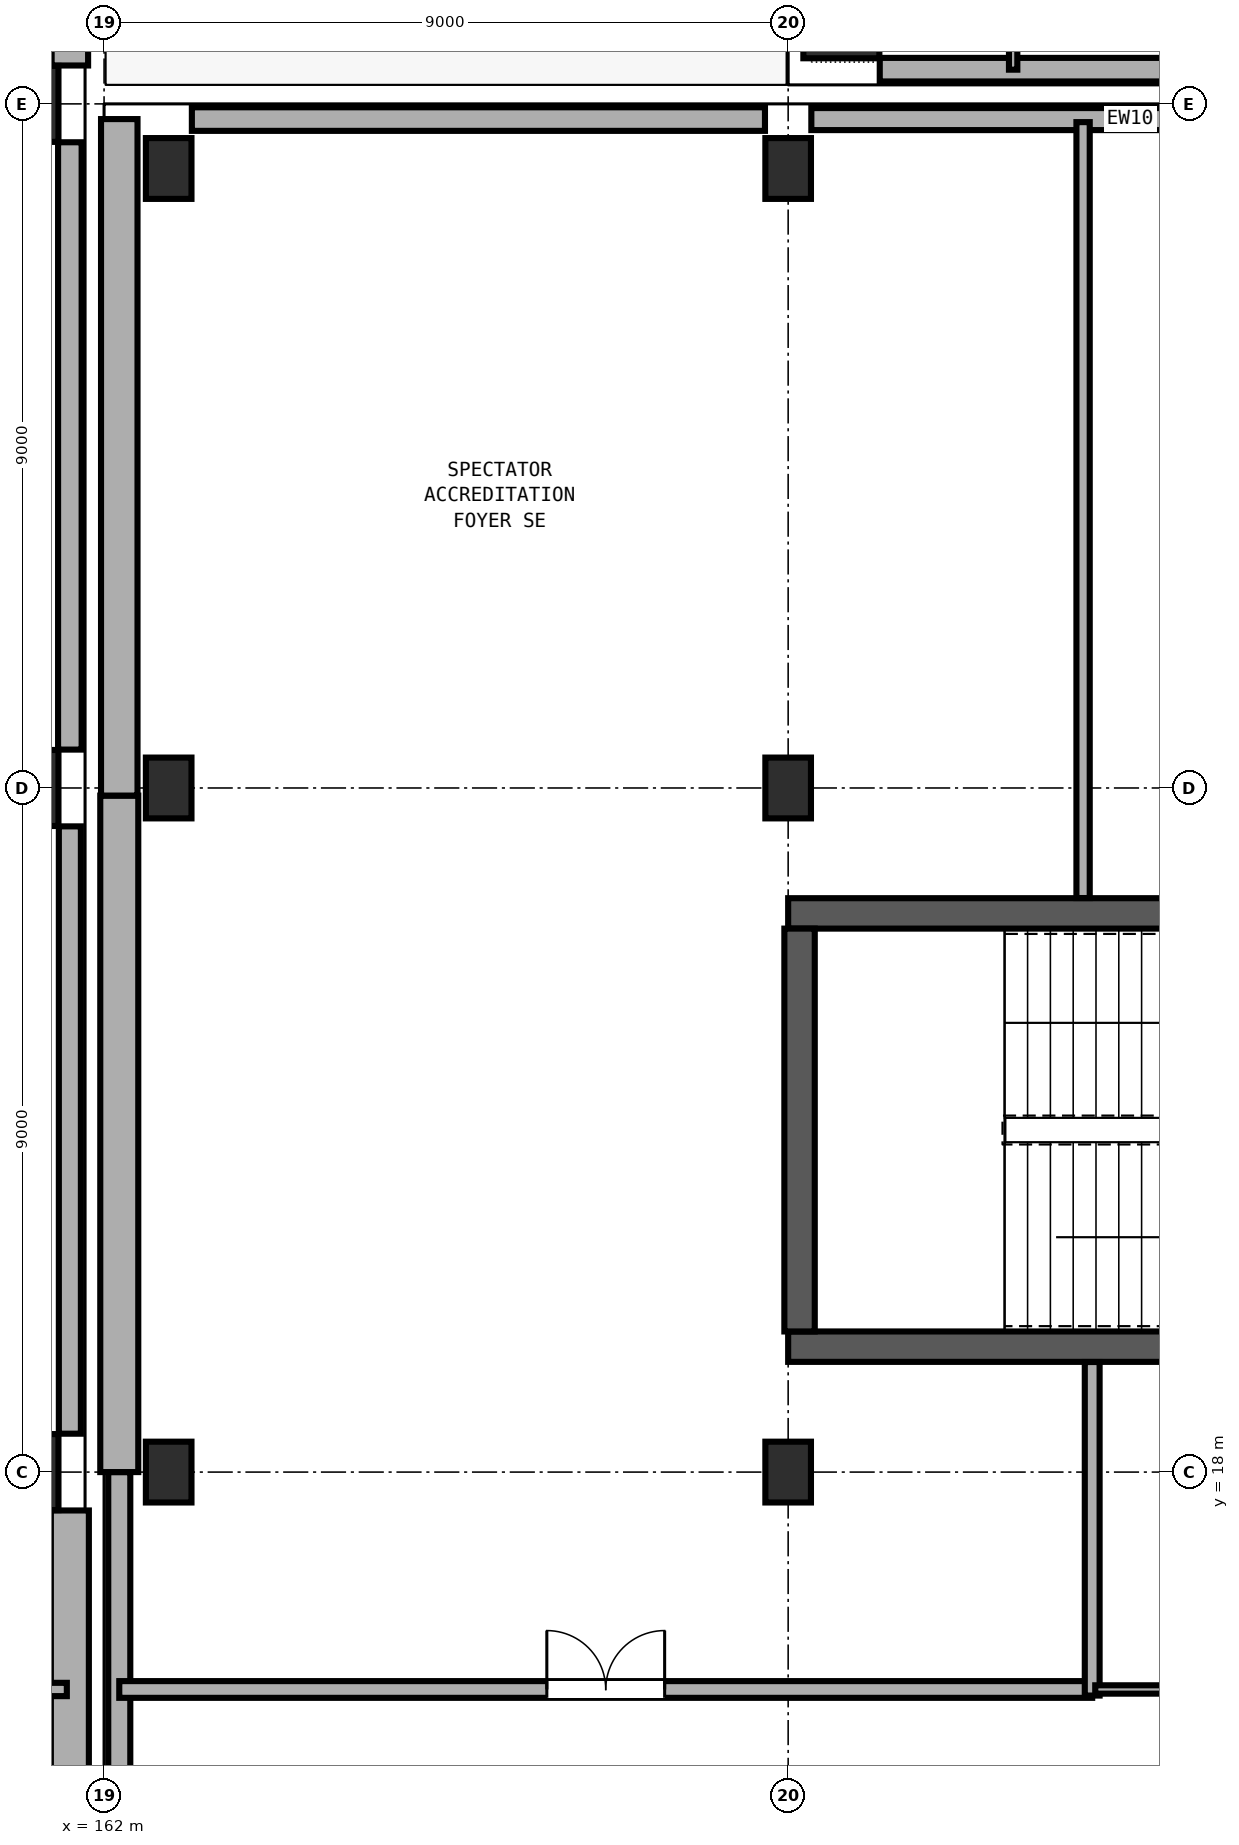
"""IFC4 building model, lengths in metres.
Left out: names, types, materials, properties, quantities, classifications, styles, units other than length and angle.
Written with IfcOpenShell. Run it as: python <this file> out.ifc"""

import sys

from ifc_helpers import new_model, si_unit, direction, frame, frame_2d, origin, origin_2d, place, context, subcontext, project, spatial, rectangle, extrude, element, fill, save


model = new_model("IFC4")
c1 = context("Model", 3, precision=1e-05, world=origin(), true_north=direction((0.0, 1.0)))
c2 = subcontext(c1, "Body", "Model", "MODEL_VIEW")
j1 = project(units=[si_unit("LENGTHUNIT", "METRE"), si_unit("PLANEANGLEUNIT", "RADIAN")], contexts=[c1])
p1 = place(None, origin())
s1 = spatial("IfcSite", under=j1, at=p1, CompositionType="ELEMENT")
p2 = place(p1, origin())
s2 = spatial("IfcBuilding", under=s1, at=p2, CompositionType="ELEMENT")
p3 = place(p2, origin())
s3 = spatial("IfcBuildingStorey", under=s2, at=p3, CompositionType="ELEMENT", Elevation=0.0)
for number, where, z_axis, x_axis in (
    (1, (171.7, 37.1, 0.0), (0.0, 0.0, 1.0), (1.0, 0.0, 0.0)),
    (2, (160.9, 18.0, 0.0), (0.0, 0.0, 1.0), (1.0, 0.0, 0.0)),
    (3, (160.9, 27.0, 0.0), (0.0, 0.0, 1.0), (1.0, 0.0, 0.0)),
    (4, (160.9, 36.0, 0.0), (0.0, 0.0, 1.0), (1.0, 0.0, 0.0)),
):
    element("IfcColumn", number, at=place(p3, frame(where, z_axis=z_axis, x_axis=x_axis)), inside=s3, PredefinedType="COLUMN", context=c2, shape_type="SweptSolid", body=[
        extrude(rectangle(XDim=1.0, YDim=1.0, at=origin_2d()), origin(), (0.0, 0.0, 1.0), 4.8),
    ])
for number, where, z_axis, x_axis in (
    (5, (162.85, 18.0, 0.0), (0.0, 0.0, 1.0), (1.0, 0.0, 0.0)),
    (6, (162.85, 27.0, 0.0), (0.0, 0.0, 1.0), (1.0, 0.0, 0.0)),
    (7, (162.85, 35.15, 0.0), (0.0, 0.0, 1.0), (1.0, 0.0, 0.0)),
    (8, (171.0, 18.0, 0.0), (0.0, 0.0, 1.0), (1.0, 0.0, 0.0)),
    (9, (171.0, 27.0, 0.0), (0.0, 0.0, 1.0), (1.0, 0.0, 0.0)),
    (10, (171.0, 35.15, 0.0), (0.0, 0.0, 1.0), (1.0, 0.0, 0.0)),
):
    element("IfcColumn", number, at=place(p3, frame(where, z_axis=z_axis, x_axis=x_axis)), inside=s3, PredefinedType="COLUMN", context=c2, shape_type="SweptSolid", body=[
        extrude(rectangle(XDim=0.6, YDim=0.8, at=origin_2d()), origin(), (0.0, 0.0, 1.0), 4.8),
    ])
p4 = place(p3, frame((171.0, 19.65, 0.0), z_axis=(0.0, 0.0, 1.0), x_axis=(1.0, 0.0, 0.0)))
e11 = element("IfcWall", 11, at=p4, inside=s3, PredefinedType="SHEAR", context=c2, shape_type="SweptSolid", body=[
    extrude(rectangle(XDim=18.0, YDim=0.4, at=frame_2d((9.0, 0.0))), origin(), (0.0, 0.0, 1.0), 4.5),
])
p5 = place(p4, frame((11.4, 0.0, 0.0)))
e12 = element("IfcOpeningElement", 12, at=p5, cuts=e11, PredefinedType="OPENING", context=c2, shape_type="SweptSolid", body=[
    extrude(rectangle(XDim=1.9, YDim=2.25, at=frame_2d((0.95, 1.125))), frame((0.0, 0.21, 0.0), z_axis=(0.0, -1.0, 0.0), x_axis=(1.0, 0.0, 0.0)), (0.0, 0.0, 1.0), 0.42),
])
p6 = place(p3, frame((189.0, 25.35, 0.0), z_axis=(0.0, 0.0, 1.0), x_axis=(-1.0, 0.0, 0.0)))
e13 = element("IfcWall", 13, at=p6, inside=s3, PredefinedType="SHEAR", context=c2, shape_type="SweptSolid", body=[
    extrude(rectangle(XDim=18.0, YDim=0.4, at=frame_2d((9.0, 0.0))), origin(), (0.0, 0.0, 1.0), 4.5),
])
p7 = place(p3, frame((171.15, 25.15, 0.0), z_axis=(0.0, 0.0, 1.0), x_axis=(0.0, -1.0, 0.0)))
e14 = element("IfcWall", 14, at=p7, inside=s3, PredefinedType="SHEAR", context=c2, shape_type="SweptSolid", body=[
    extrude(rectangle(XDim=5.3, YDim=0.4, at=frame_2d((2.65, 0.0))), origin(), (0.0, 0.0, 1.0), 4.5),
])
p8 = place(p3, frame((179.445, 36.45, 0.0), z_axis=(0.0, 0.0, 1.0), x_axis=(-1.0, 0.0, 0.0)))
e15 = element("IfcWall", 15, at=p8, inside=s3, PredefinedType="SOLIDWALL", context=c2, shape_type="SweptSolid", body=[
    extrude(rectangle(XDim=7.24, YDim=0.31, at=frame_2d((3.62, 0.0))), origin(), (0.0, 0.0, 1.0), 3.28),
])
p9 = place(p3, frame((161.55, 44.8, 0.0), z_axis=(0.0, 0.0, 1.0), x_axis=(0.0, -1.0, 0.0)))
e16 = element("IfcWall", 16, at=p9, inside=s3, PredefinedType="SOLIDWALL", context=c2, shape_type="SweptSolid", body=[
    extrude(rectangle(XDim=8.295, YDim=0.48, at=frame_2d((4.147, 0.0))), origin(), (0.0, 0.0, 1.0), 3.28),
])
p10 = place(p3, frame((161.55, 35.495, 0.0), z_axis=(0.0, 0.0, 1.0), x_axis=(0.0, -1.0, 0.0)))
e17 = element("IfcWall", 17, at=p10, inside=s3, PredefinedType="SOLIDWALL", context=c2, shape_type="SweptSolid", body=[
    extrude(rectangle(XDim=7.99, YDim=0.31, at=frame_2d((3.995, 0.0))), origin(), (0.0, 0.0, 1.0), 3.28),
])
p11 = place(p3, frame((161.55, 26.495, 0.0), z_axis=(0.0, 0.0, 1.0), x_axis=(0.0, -1.0, 0.0)))
e18 = element("IfcWall", 18, at=p11, inside=s3, PredefinedType="SOLIDWALL", context=c2, shape_type="SweptSolid", body=[
    extrude(rectangle(XDim=7.99, YDim=0.29, at=frame_2d((3.995, 0.0))), origin(), (0.0, 0.0, 1.0), 3.28),
])
p12 = place(p3, frame((161.55, 17.495, 0.0), z_axis=(0.0, 0.0, 1.0), x_axis=(0.0, -1.0, 0.0)))
e19 = element("IfcWall", 19, at=p12, inside=s3, PredefinedType="SOLIDWALL", context=c2, shape_type="SweptSolid", body=[
    extrude(rectangle(XDim=7.99, YDim=0.5, at=frame_2d((3.995, 0.0))), origin(), (0.0, 0.0, 1.0), 3.28),
])
p13 = place(p3, frame((162.2, 9.1, 0.0), z_axis=(0.0, 0.0, 1.0), x_axis=(0.0, 1.0, 0.0)))
e20 = element("IfcWall", 20, at=p13, inside=s3, PredefinedType="SOLIDWALL", context=c2, shape_type="SweptSolid", body=[
    extrude(rectangle(XDim=8.9, YDim=0.29, at=frame_2d((4.45, 0.0))), origin(), (0.0, 0.0, 1.0), 3.28),
])
p14 = place(p3, frame((162.2, 18.0, 0.0), z_axis=(0.0, 0.0, 1.0), x_axis=(0.0, 1.0, 0.0)))
e21 = element("IfcWall", 21, at=p14, inside=s3, PredefinedType="SOLIDWALL", context=c2, shape_type="SweptSolid", body=[
    extrude(rectangle(XDim=8.9, YDim=0.5, at=frame_2d((4.45, 0.0))), origin(), (0.0, 0.0, 1.0), 3.28),
])
p15 = place(p3, frame((162.2, 26.9, 0.0), z_axis=(0.0, 0.0, 1.0), x_axis=(0.0, 1.0, 0.0)))
e22 = element("IfcWall", 22, at=p15, inside=s3, PredefinedType="SOLIDWALL", context=c2, shape_type="SweptSolid", body=[
    extrude(rectangle(XDim=8.9, YDim=0.48, at=frame_2d((4.45, 0.0))), origin(), (0.0, 0.0, 1.0), 3.28),
])
p16 = place(p3, frame((163.155, 35.8, 0.0), z_axis=(0.0, 0.0, 1.0), x_axis=(1.0, 0.0, 0.0)))
e23 = element("IfcWall", 23, at=p16, inside=s3, PredefinedType="SOLIDWALL", context=c2, shape_type="SweptSolid", body=[
    extrude(rectangle(XDim=7.54, YDim=0.31, at=frame_2d((3.77, 0.0))), origin(), (0.0, 0.0, 1.0), 3.28),
])
p17 = place(p3, frame((171.305, 35.8, 0.0), z_axis=(0.0, 0.0, 1.0), x_axis=(1.0, 0.0, 0.0)))
e24 = element("IfcWall", 24, at=p17, inside=s3, PredefinedType="SOLIDWALL", context=c2, shape_type="SweptSolid", body=[
    extrude(rectangle(XDim=8.39, YDim=0.29, at=frame_2d((4.195, 0.0))), origin(), (0.0, 0.0, 1.0), 3.28),
])
p18 = place(p3, frame((173.96, 36.45, 0.0), z_axis=(0.0, 0.0, 1.0), x_axis=(0.0, 1.0, 0.0)))
e25 = element("IfcWall", 25, at=p18, inside=s3, PredefinedType="PARTITIONING", context=c2, shape_type="SweptSolid", body=[
    extrude(rectangle(XDim=17.892, YDim=0.11, at=frame_2d((8.946, 0.0))), origin(), (0.0, 0.0, 1.0), 3.28),
])
p19 = place(p18, frame((6.203, 0.0, 0.0)))
e26 = element("IfcOpeningElement", 26, at=p19, cuts=e25, PredefinedType="OPENING", context=c2, shape_type="SweptSolid", body=[
    extrude(rectangle(XDim=1.25, YDim=2.15, at=frame_2d((0.625, 1.075))), frame((0.0, 0.065, 0.0), z_axis=(0.0, -1.0, 0.0), x_axis=(1.0, 0.0, 0.0)), (0.0, 0.0, 1.0), 0.13),
])
p20 = place(p3, frame((161.51, 15.14, 0.0), z_axis=(0.0, 0.0, 1.0), x_axis=(-1.0, 0.0, 0.0)))
e27 = element("IfcWall", 27, at=p20, inside=s3, PredefinedType="PARTITIONING", context=c2, shape_type="SweptSolid", body=[
    extrude(rectangle(XDim=11.95, YDim=0.175, at=frame_2d((5.975, 0.0))), origin(), (0.0, 0.0, 1.0), 3.28),
])
p21 = place(p3, frame((162.2, 15.14, 0.0), z_axis=(0.0, 0.0, 1.0), x_axis=(1.0, 0.0, 0.0)))
e28 = element("IfcWall", 28, at=p21, inside=s3, PredefinedType="PARTITIONING", context=c2, shape_type="SweptSolid", body=[
    extrude(rectangle(XDim=12.8, YDim=0.22, at=frame_2d((6.4, 0.0))), origin(), (0.0, 0.0, 1.0), 3.28),
])
p22 = place(p21, frame((5.625, 0.0, 0.0)))
e29 = element("IfcOpeningElement", 29, at=p22, cuts=e28, PredefinedType="OPENING", context=c2, shape_type="SweptSolid", body=[
    extrude(rectangle(XDim=1.55, YDim=2.2, at=frame_2d((0.775, 1.1))), frame((0.0, 0.12, 0.0), z_axis=(0.0, -1.0, 0.0), x_axis=(1.0, 0.0, 0.0)), (0.0, 0.0, 1.0), 0.24),
])
p23 = place(p3, frame((175.0, 19.448, 0.0), z_axis=(0.0, 0.0, 1.0), x_axis=(0.0, -1.0, 0.0)))
e30 = element("IfcWall", 30, at=p23, inside=s3, PredefinedType="PARTITIONING", context=c2, shape_type="SweptSolid", body=[
    extrude(rectangle(XDim=4.388, YDim=0.195, at=frame_2d((2.194, 0.0))), origin(), (0.0, 0.0, 1.0), 3.28),
])
p24 = place(p3, frame((174.88, 35.76, 0.0), z_axis=(0.0, 0.0, 1.0), x_axis=(0.0, -1.0, 0.0)))
e31 = element("IfcWall", 31, at=p24, inside=s3, PredefinedType="PARTITIONING", context=c2, shape_type="SweptSolid", body=[
    extrude(rectangle(XDim=10.208, YDim=0.175, at=frame_2d((5.104, 0.0))), origin(), (0.0, 0.0, 1.0), 3.28),
])
p25 = place(p3, frame((181.34, 15.14, 0.0), z_axis=(0.0, 0.0, 1.0), x_axis=(-1.0, 0.0, 0.0)))
e32 = element("IfcWall", 32, at=p25, inside=s3, PredefinedType="PARTITIONING", context=c2, shape_type="SweptSolid", body=[
    extrude(rectangle(XDim=6.3, YDim=0.11, at=frame_2d((3.15, 0.0))), origin(), (0.0, 0.0, 1.0), 3.28),
])
p26 = place(p22, origin())
e33 = element("IfcDoor", 33, at=p26, inside=s3, OperationType="DOUBLE_DOOR_SINGLE_SWING", PredefinedType="DOOR", context=c2, shape_type="SweptSolid", body=[
    extrude(rectangle(XDim=1.55, YDim=2.2, at=frame_2d((0.775, 1.1))), frame((0.0, 0.025, 0.0), z_axis=(0.0, -1.0, 0.0), x_axis=(1.0, 0.0, 0.0)), (0.0, 0.0, 1.0), 0.05),
])
fill(e29, e33)
save(model, sys.argv[1])
